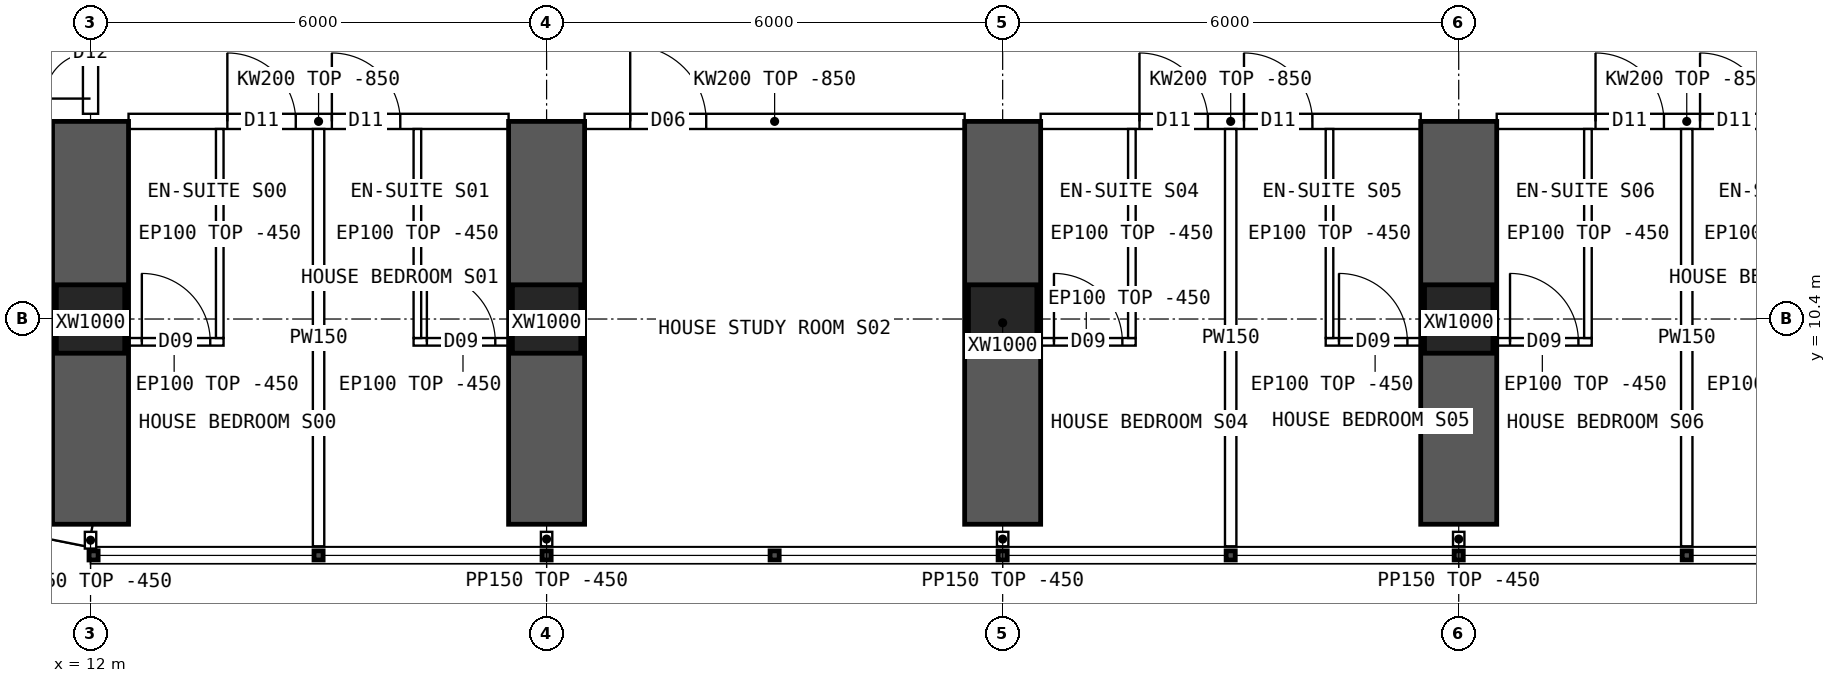
"""IFC4 building model, lengths in metres.
Left out: names, types, materials, properties, quantities, classifications, styles, units other than length and angle.
Written with IfcOpenShell. Run it as: python <this file> out.ifc"""

import sys

from ifc_helpers import new_model, si_unit, direction, frame, frame_2d, origin, origin_2d, place, context, subcontext, project, spatial, polyline, rectangle, hollow_rectangle, outline, extrude, element, fill, save


model = new_model("IFC4")
c1 = context("Model", 3, precision=1e-05, world=origin(), true_north=direction((0.0, 1.0)))
c2 = subcontext(c1, "Body", "Model", "MODEL_VIEW")
j1 = project(units=[si_unit("LENGTHUNIT", "METRE"), si_unit("PLANEANGLEUNIT", "RADIAN")], contexts=[c1])
p1 = place(None, origin())
s1 = spatial("IfcSite", under=j1, at=p1, CompositionType="ELEMENT")
p2 = place(p1, origin())
s2 = spatial("IfcBuilding", under=s1, at=p2, CompositionType="ELEMENT")
p3 = place(p2, frame((0.0, 0.0, 50.2)))
s3 = spatial("IfcBuildingStorey", under=s2, at=p3, CompositionType="ELEMENT", Elevation=50.2)
for number, where, z_axis, x_axis in (
    (1, (12.0, 10.4, 0.0), (0.0, 0.0, 1.0), (1.0, 0.0, 0.0)),
    (2, (18.0, 10.4, 0.0), (0.0, 0.0, 1.0), (1.0, 0.0, 0.0)),
    (3, (24.0, 10.4, 0.0), (0.0, 0.0, 1.0), (1.0, 0.0, 0.0)),
    (4, (30.0, 10.4, 0.0), (0.0, 0.0, 1.0), (1.0, 0.0, 0.0)),
):
    element("IfcColumn", number, at=place(p3, frame(where, z_axis=z_axis, x_axis=x_axis)), inside=s3, PredefinedType="COLUMN", context=c2, shape_type="SweptSolid", body=[
        extrude(hollow_rectangle(XDim=0.9, YDim=0.9, WallThickness=0.09, at=origin_2d()), origin(), (0.0, 0.0, 1.0), 3.75),
    ])
for number, where, z_axis, x_axis in (
    (5, (12.0, 7.7, 0.0), (0.0, 0.0, 1.0), (0.0, 1.0, 0.0)),
    (6, (18.0, 7.7, 0.0), (0.0, 0.0, 1.0), (0.0, 1.0, 0.0)),
    (7, (24.0, 7.7, 0.0), (0.0, 0.0, 1.0), (0.0, 1.0, 0.0)),
    (8, (30.0, 7.7, 0.0), (0.0, 0.0, 1.0), (0.0, 1.0, 0.0)),
):
    element("IfcWall", number, at=place(p3, frame(where, z_axis=z_axis, x_axis=x_axis)), inside=s3, PredefinedType="SHEAR", context=c2, shape_type="SweptSolid", body=[
        extrude(rectangle(XDim=5.3, YDim=1.0, at=frame_2d((2.65, 0.0))), origin(), (0.0, 0.0, 1.0), 3.75),
    ])
p4 = place(p3, frame((8.843, 8.178, 0.0), z_axis=(0.0, 0.0, 1.0), x_axis=(0.980787251524, -0.195080412259, 0.0)))
e9 = element("IfcWall", 9, at=p4, inside=s3, PredefinedType="SOLIDWALL", context=c2, shape_type="SweptSolid", body=[
    extrude(outline(polyline([(-0.03, -0.15), (3.249, -0.15), (3.189, 0.15), (0.03, 0.15), (-0.03, -0.15)])), origin(), (0.0, 0.0, 1.0), 3.3),
])
p5 = place(p4, frame((0.909, 0.0, 0.9)))
e10 = element("IfcOpeningElement", 10, at=p5, cuts=e9, PredefinedType="OPENING", context=c2, shape_type="SweptSolid", body=[
    extrude(rectangle(XDim=1.4, YDim=1.8, at=frame_2d((0.7, 0.9))), frame((0.0, 0.16, 0.0), z_axis=(0.0, -1.0, 0.0), x_axis=(1.0, 0.0, 0.0)), (0.0, 0.0, 1.0), 0.32),
])
p6 = place(p3, frame((12.5, 13.0, 0.0), z_axis=(0.0, 0.0, 1.0), x_axis=(1.0, 0.0, 0.0)))
e11 = element("IfcWall", 11, at=p6, inside=s3, PredefinedType="SOLIDWALL", context=c2, shape_type="SweptSolid", body=[
    extrude(outline(polyline([(0.0, 0.0), (5.0, 0.0), (5.0, 2.9), (0.0, 2.9), (0.0, 0.0)])), frame((0.0, 0.1, 0.0), z_axis=(0.0, -1.0, 0.0), x_axis=(1.0, 0.0, 0.0)), (0.0, 0.0, 1.0), 0.2),
])
p7 = place(p6, frame((1.3, 0.0, 0.0)))
e12 = element("IfcOpeningElement", 12, at=p7, cuts=e11, PredefinedType="OPENING", context=c2, shape_type="SweptSolid", body=[
    extrude(rectangle(XDim=0.9, YDim=2.1, at=frame_2d((0.45, 1.05))), frame((0.0, 0.11, 0.0), z_axis=(0.0, -1.0, 0.0), x_axis=(1.0, 0.0, 0.0)), (0.0, 0.0, 1.0), 0.22),
])
p8 = place(p6, frame((2.675, 0.0, 0.0)))
e13 = element("IfcOpeningElement", 13, at=p8, cuts=e11, PredefinedType="OPENING", context=c2, shape_type="SweptSolid", body=[
    extrude(rectangle(XDim=0.9, YDim=2.1, at=frame_2d((0.45, 1.05))), frame((0.0, 0.11, 0.0), z_axis=(0.0, -1.0, 0.0), x_axis=(1.0, 0.0, 0.0)), (0.0, 0.0, 1.0), 0.22),
])
p9 = place(p3, frame((18.5, 13.0, 0.0), z_axis=(0.0, 0.0, 1.0), x_axis=(1.0, 0.0, 0.0)))
e14 = element("IfcWall", 14, at=p9, inside=s3, PredefinedType="SOLIDWALL", context=c2, shape_type="SweptSolid", body=[
    extrude(outline(polyline([(0.0, 0.0), (5.0, 0.0), (5.0, 2.9), (0.0, 2.9), (0.0, 0.0)])), frame((0.0, 0.1, 0.0), z_axis=(0.0, -1.0, 0.0), x_axis=(1.0, 0.0, 0.0)), (0.0, 0.0, 1.0), 0.2),
])
p10 = place(p9, frame((0.6, 0.0, 0.0)))
e15 = element("IfcOpeningElement", 15, at=p10, cuts=e14, PredefinedType="OPENING", context=c2, shape_type="SweptSolid", body=[
    extrude(rectangle(XDim=1.0, YDim=2.1, at=frame_2d((0.5, 1.05))), frame((0.0, 0.11, 0.0), z_axis=(0.0, -1.0, 0.0), x_axis=(1.0, 0.0, 0.0)), (0.0, 0.0, 1.0), 0.22),
])
p11 = place(p3, frame((24.5, 13.0, 0.0), z_axis=(0.0, 0.0, 1.0), x_axis=(1.0, 0.0, 0.0)))
e16 = element("IfcWall", 16, at=p11, inside=s3, PredefinedType="SOLIDWALL", context=c2, shape_type="SweptSolid", body=[
    extrude(outline(polyline([(0.0, 0.0), (5.0, 0.0), (5.0, 2.9), (0.0, 2.9), (0.0, 0.0)])), frame((0.0, 0.1, 0.0), z_axis=(0.0, -1.0, 0.0), x_axis=(1.0, 0.0, 0.0)), (0.0, 0.0, 1.0), 0.2),
])
p12 = place(p11, frame((1.3, 0.0, 0.0)))
e17 = element("IfcOpeningElement", 17, at=p12, cuts=e16, PredefinedType="OPENING", context=c2, shape_type="SweptSolid", body=[
    extrude(rectangle(XDim=0.9, YDim=2.1, at=frame_2d((0.45, 1.05))), frame((0.0, 0.11, 0.0), z_axis=(0.0, -1.0, 0.0), x_axis=(1.0, 0.0, 0.0)), (0.0, 0.0, 1.0), 0.22),
])
p13 = place(p11, frame((2.675, 0.0, 0.0)))
e18 = element("IfcOpeningElement", 18, at=p13, cuts=e16, PredefinedType="OPENING", context=c2, shape_type="SweptSolid", body=[
    extrude(rectangle(XDim=0.9, YDim=2.1, at=frame_2d((0.45, 1.05))), frame((0.0, 0.11, 0.0), z_axis=(0.0, -1.0, 0.0), x_axis=(1.0, 0.0, 0.0)), (0.0, 0.0, 1.0), 0.22),
])
p14 = place(p3, frame((30.5, 13.0, 0.0), z_axis=(0.0, 0.0, 1.0), x_axis=(1.0, 0.0, 0.0)))
e19 = element("IfcWall", 19, at=p14, inside=s3, PredefinedType="SOLIDWALL", context=c2, shape_type="SweptSolid", body=[
    extrude(outline(polyline([(0.0, 0.0), (5.0, 0.0), (5.0, 2.9), (0.0, 2.9), (0.0, 0.0)])), frame((0.0, 0.1, 0.0), z_axis=(0.0, -1.0, 0.0), x_axis=(1.0, 0.0, 0.0)), (0.0, 0.0, 1.0), 0.2),
])
p15 = place(p14, frame((1.3, 0.0, 0.0)))
e20 = element("IfcOpeningElement", 20, at=p15, cuts=e19, PredefinedType="OPENING", context=c2, shape_type="SweptSolid", body=[
    extrude(rectangle(XDim=0.9, YDim=2.1, at=frame_2d((0.45, 1.05))), frame((0.0, 0.11, 0.0), z_axis=(0.0, -1.0, 0.0), x_axis=(1.0, 0.0, 0.0)), (0.0, 0.0, 1.0), 0.22),
])
p16 = place(p14, frame((2.675, 0.0, 0.0)))
e21 = element("IfcOpeningElement", 21, at=p16, cuts=e19, PredefinedType="OPENING", context=c2, shape_type="SweptSolid", body=[
    extrude(rectangle(XDim=0.9, YDim=2.1, at=frame_2d((0.45, 1.05))), frame((0.0, 0.11, 0.0), z_axis=(0.0, -1.0, 0.0), x_axis=(1.0, 0.0, 0.0)), (0.0, 0.0, 1.0), 0.22),
])
p17 = place(p3, frame((15.0, 7.41, 0.0), z_axis=(0.0, 0.0, 1.0), x_axis=(0.0, 1.0, 0.0)))
e22 = element("IfcWall", 22, at=p17, inside=s3, PredefinedType="PARTITIONING", context=c2, shape_type="SweptSolid", body=[
    extrude(outline(polyline([(0.0, 0.0), (5.49, 0.0), (5.49, 2.9), (5.442, 2.9), (5.44, 3.3), (3.192, 3.3), (3.19, 2.9), (2.792, 2.9), (2.79, 3.3), (0.0, 3.3), (0.0, 0.0)])), frame((0.0, 0.075, 0.0), z_axis=(0.0, -1.0, 0.0), x_axis=(1.0, 0.0, 0.0)), (0.0, 0.0, 1.0), 0.15),
])
p18 = place(p3, frame((13.75, 10.1, 0.0), z_axis=(0.0, 0.0, 1.0), x_axis=(-1.0, 0.0, 0.0)))
e23 = element("IfcWall", 23, at=p18, inside=s3, PredefinedType="PARTITIONING", context=c2, shape_type="SweptSolid", body=[
    extrude(rectangle(XDim=1.3, YDim=0.1, at=frame_2d((0.65, 0.0))), origin(), (0.0, 0.0, 1.0), 3.3),
])
p19 = place(p18, frame((0.175, 0.0, 0.0)))
e24 = element("IfcOpeningElement", 24, at=p19, cuts=e23, PredefinedType="OPENING", context=c2, shape_type="SweptSolid", body=[
    extrude(rectangle(XDim=0.9, YDim=2.1, at=frame_2d((0.45, 1.05))), frame((0.0, 0.06, 0.0), z_axis=(0.0, -1.0, 0.0), x_axis=(1.0, 0.0, 0.0)), (0.0, 0.0, 1.0), 0.12),
])
p20 = place(p3, frame((13.7, 10.15, 0.0), z_axis=(0.0, 0.0, 1.0), x_axis=(0.0, 1.0, 0.0)))
e25 = element("IfcWall", 25, at=p20, inside=s3, PredefinedType="PARTITIONING", context=c2, shape_type="SweptSolid", body=[
    extrude(outline(polyline([(0.0, 0.0), (2.75, 0.0), (2.75, 2.9), (2.702, 2.9), (2.7, 3.3), (0.452, 3.3), (0.45, 2.9), (0.052, 2.9), (0.05, 3.3), (0.0, 3.3), (0.0, 0.0)])), frame((0.0, 0.05, 0.0), z_axis=(0.0, -1.0, 0.0), x_axis=(1.0, 0.0, 0.0)), (0.0, 0.0, 1.0), 0.1),
])
p21 = place(p3, frame((17.55, 10.1, 0.0), z_axis=(0.0, 0.0, 1.0), x_axis=(-1.0, 0.0, 0.0)))
e26 = element("IfcWall", 26, at=p21, inside=s3, PredefinedType="PARTITIONING", context=c2, shape_type="SweptSolid", body=[
    extrude(rectangle(XDim=1.3, YDim=0.1, at=frame_2d((0.65, 0.0))), origin(), (0.0, 0.0, 1.0), 3.3),
])
p22 = place(p21, frame((0.225, 0.0, 0.0)))
e27 = element("IfcOpeningElement", 27, at=p22, cuts=e26, PredefinedType="OPENING", context=c2, shape_type="SweptSolid", body=[
    extrude(rectangle(XDim=0.9, YDim=2.1, at=frame_2d((0.45, 1.05))), frame((0.0, 0.06, 0.0), z_axis=(0.0, -1.0, 0.0), x_axis=(1.0, 0.0, 0.0)), (0.0, 0.0, 1.0), 0.12),
])
p23 = place(p3, frame((16.3, 10.15, 0.0), z_axis=(0.0, 0.0, 1.0), x_axis=(0.0, 1.0, 0.0)))
e28 = element("IfcWall", 28, at=p23, inside=s3, PredefinedType="PARTITIONING", context=c2, shape_type="SweptSolid", body=[
    extrude(outline(polyline([(0.0, 0.0), (2.75, 0.0), (2.75, 2.9), (2.702, 2.9), (2.7, 3.3), (0.452, 3.3), (0.45, 2.9), (0.052, 2.9), (0.05, 3.3), (0.0, 3.3), (0.0, 0.0)])), frame((0.0, 0.05, 0.0), z_axis=(0.0, -1.0, 0.0), x_axis=(1.0, 0.0, 0.0)), (0.0, 0.0, 1.0), 0.1),
])
p24 = place(p3, frame((27.0, 7.41, 0.0), z_axis=(0.0, 0.0, 1.0), x_axis=(0.0, 1.0, 0.0)))
e29 = element("IfcWall", 29, at=p24, inside=s3, PredefinedType="PARTITIONING", context=c2, shape_type="SweptSolid", body=[
    extrude(outline(polyline([(0.0, 0.0), (5.49, 0.0), (5.49, 2.9), (5.442, 2.9), (5.44, 3.3), (3.192, 3.3), (3.19, 2.9), (2.792, 2.9), (2.79, 3.3), (0.0, 3.3), (0.0, 0.0)])), frame((0.0, 0.075, 0.0), z_axis=(0.0, -1.0, 0.0), x_axis=(1.0, 0.0, 0.0)), (0.0, 0.0, 1.0), 0.15),
])
p25 = place(p3, frame((25.75, 10.1, 0.0), z_axis=(0.0, 0.0, 1.0), x_axis=(-1.0, 0.0, 0.0)))
e30 = element("IfcWall", 30, at=p25, inside=s3, PredefinedType="PARTITIONING", context=c2, shape_type="SweptSolid", body=[
    extrude(rectangle(XDim=1.3, YDim=0.1, at=frame_2d((0.65, 0.0))), origin(), (0.0, 0.0, 1.0), 3.3),
])
p26 = place(p25, frame((0.175, 0.0, 0.0)))
e31 = element("IfcOpeningElement", 31, at=p26, cuts=e30, PredefinedType="OPENING", context=c2, shape_type="SweptSolid", body=[
    extrude(rectangle(XDim=0.9, YDim=2.1, at=frame_2d((0.45, 1.05))), frame((0.0, 0.06, 0.0), z_axis=(0.0, -1.0, 0.0), x_axis=(1.0, 0.0, 0.0)), (0.0, 0.0, 1.0), 0.12),
])
p27 = place(p3, frame((25.7, 10.15, 0.0), z_axis=(0.0, 0.0, 1.0), x_axis=(0.0, 1.0, 0.0)))
e32 = element("IfcWall", 32, at=p27, inside=s3, PredefinedType="PARTITIONING", context=c2, shape_type="SweptSolid", body=[
    extrude(outline(polyline([(0.0, 0.0), (2.75, 0.0), (2.75, 2.9), (2.702, 2.9), (2.7, 3.3), (0.452, 3.3), (0.45, 2.9), (0.052, 2.9), (0.05, 3.3), (0.0, 3.3), (0.0, 0.0)])), frame((0.0, 0.05, 0.0), z_axis=(0.0, -1.0, 0.0), x_axis=(1.0, 0.0, 0.0)), (0.0, 0.0, 1.0), 0.1),
])
p28 = place(p3, frame((29.55, 10.1, 0.0), z_axis=(0.0, 0.0, 1.0), x_axis=(-1.0, 0.0, 0.0)))
e33 = element("IfcWall", 33, at=p28, inside=s3, PredefinedType="PARTITIONING", context=c2, shape_type="SweptSolid", body=[
    extrude(rectangle(XDim=1.3, YDim=0.1, at=frame_2d((0.65, 0.0))), origin(), (0.0, 0.0, 1.0), 3.3),
])
p29 = place(p28, frame((0.225, 0.0, 0.0)))
e34 = element("IfcOpeningElement", 34, at=p29, cuts=e33, PredefinedType="OPENING", context=c2, shape_type="SweptSolid", body=[
    extrude(rectangle(XDim=0.9, YDim=2.1, at=frame_2d((0.45, 1.05))), frame((0.0, 0.06, 0.0), z_axis=(0.0, -1.0, 0.0), x_axis=(1.0, 0.0, 0.0)), (0.0, 0.0, 1.0), 0.12),
])
p30 = place(p3, frame((28.3, 10.15, 0.0), z_axis=(0.0, 0.0, 1.0), x_axis=(0.0, 1.0, 0.0)))
e35 = element("IfcWall", 35, at=p30, inside=s3, PredefinedType="PARTITIONING", context=c2, shape_type="SweptSolid", body=[
    extrude(outline(polyline([(0.0, 0.0), (2.75, 0.0), (2.75, 2.9), (2.702, 2.9), (2.7, 3.3), (0.452, 3.3), (0.45, 2.9), (0.052, 2.9), (0.05, 3.3), (0.0, 3.3), (0.0, 0.0)])), frame((0.0, 0.05, 0.0), z_axis=(0.0, -1.0, 0.0), x_axis=(1.0, 0.0, 0.0)), (0.0, 0.0, 1.0), 0.1),
])
p31 = place(p3, frame((33.0, 7.41, 0.0), z_axis=(0.0, 0.0, 1.0), x_axis=(0.0, 1.0, 0.0)))
e36 = element("IfcWall", 36, at=p31, inside=s3, PredefinedType="PARTITIONING", context=c2, shape_type="SweptSolid", body=[
    extrude(outline(polyline([(0.0, 0.0), (5.49, 0.0), (5.49, 2.9), (5.442, 2.9), (5.44, 3.3), (3.192, 3.3), (3.19, 2.9), (2.792, 2.9), (2.79, 3.3), (0.0, 3.3), (0.0, 0.0)])), frame((0.0, 0.075, 0.0), z_axis=(0.0, -1.0, 0.0), x_axis=(1.0, 0.0, 0.0)), (0.0, 0.0, 1.0), 0.15),
])
p32 = place(p3, frame((31.75, 10.1, 0.0), z_axis=(0.0, 0.0, 1.0), x_axis=(-1.0, 0.0, 0.0)))
e37 = element("IfcWall", 37, at=p32, inside=s3, PredefinedType="PARTITIONING", context=c2, shape_type="SweptSolid", body=[
    extrude(rectangle(XDim=1.3, YDim=0.1, at=frame_2d((0.65, 0.0))), origin(), (0.0, 0.0, 1.0), 3.3),
])
p33 = place(p32, frame((0.175, 0.0, 0.0)))
e38 = element("IfcOpeningElement", 38, at=p33, cuts=e37, PredefinedType="OPENING", context=c2, shape_type="SweptSolid", body=[
    extrude(rectangle(XDim=0.9, YDim=2.1, at=frame_2d((0.45, 1.05))), frame((0.0, 0.06, 0.0), z_axis=(0.0, -1.0, 0.0), x_axis=(1.0, 0.0, 0.0)), (0.0, 0.0, 1.0), 0.12),
])
p34 = place(p3, frame((31.7, 10.15, 0.0), z_axis=(0.0, 0.0, 1.0), x_axis=(0.0, 1.0, 0.0)))
e39 = element("IfcWall", 39, at=p34, inside=s3, PredefinedType="PARTITIONING", context=c2, shape_type="SweptSolid", body=[
    extrude(outline(polyline([(0.0, 0.0), (2.75, 0.0), (2.75, 2.9), (2.702, 2.9), (2.7, 3.3), (0.452, 3.3), (0.45, 2.9), (0.052, 2.9), (0.05, 3.3), (0.0, 3.3), (0.0, 0.0)])), frame((0.0, 0.05, 0.0), z_axis=(0.0, -1.0, 0.0), x_axis=(1.0, 0.0, 0.0)), (0.0, 0.0, 1.0), 0.1),
])
p35 = place(p3, frame((12.0, 13.1, 0.0), z_axis=(0.0, 0.0, 1.0), x_axis=(0.0, 1.0, 0.0)))
e40 = element("IfcWall", 40, at=p35, inside=s3, PredefinedType="SOLIDWALL", context=c2, shape_type="SweptSolid", body=[
    extrude(outline(polyline([(0.0, 0.0), (1.6, 0.0), (1.6, 2.85), (0.0, 2.85), (0.0, 0.0)])), frame((0.0, 0.1, 0.0), z_axis=(0.0, -1.0, 0.0), x_axis=(1.0, 0.0, 0.0)), (0.0, 0.0, 1.0), 0.2),
])
p36 = place(p35, frame((0.2, 0.0, 0.0)))
e41 = element("IfcOpeningElement", 41, at=p36, cuts=e40, PredefinedType="OPENING", context=c2, shape_type="SweptSolid", body=[
    extrude(rectangle(XDim=1.2, YDim=2.1, at=frame_2d((0.6, 1.05))), frame((0.0, 0.11, 0.0), z_axis=(0.0, -1.0, 0.0), x_axis=(1.0, 0.0, 0.0)), (0.0, 0.0, 1.0), 0.22),
])
p37 = place(p3, frame((12.0, 7.6, 0.0), z_axis=(0.0, 0.0, 1.0), x_axis=(0.0, -1.0, 0.0)))
e42 = element("IfcWall", 42, at=p37, inside=s3, PredefinedType="PARTITIONING", context=c2, shape_type="SweptSolid", body=[
    extrude(rectangle(XDim=0.22, YDim=0.15, at=frame_2d((0.11, 0.0))), origin(), (0.0, 0.0, 1.0), 3.3),
])
for number, where, z_axis, x_axis in (
    (43, (18.0, 7.6, 0.0), (0.0, 0.0, 1.0), (0.0, -1.0, 0.0)),
    (44, (24.0, 7.6, 0.0), (0.0, 0.0, 1.0), (0.0, -1.0, 0.0)),
    (45, (30.0, 7.6, 0.0), (0.0, 0.0, 1.0), (0.0, -1.0, 0.0)),
):
    element("IfcWall", number, at=place(p3, frame(where, z_axis=z_axis, x_axis=x_axis)), inside=s3, PredefinedType="PARTITIONING", context=c2, shape_type="SweptSolid", body=[
        extrude(rectangle(XDim=0.19, YDim=0.15, at=frame_2d((0.095, 0.0))), origin(), (0.0, 0.0, 1.0), 3.3),
    ])
p38 = place(p19, origin())
e46 = element("IfcDoor", 46, at=p38, inside=s3, OperationType="SINGLE_SWING_RIGHT", PredefinedType="DOOR", context=c2, shape_type="SweptSolid", body=[
    extrude(rectangle(XDim=0.9, YDim=2.1, at=frame_2d((0.45, 1.05))), frame((0.0, 0.025, 0.0), z_axis=(0.0, -1.0, 0.0), x_axis=(1.0, 0.0, 0.0)), (0.0, 0.0, 1.0), 0.05),
])
fill(e24, e46)
p39 = place(p7, origin())
e47 = element("IfcDoor", 47, at=p39, inside=s3, OperationType="SINGLE_SWING_LEFT", PredefinedType="DOOR", context=c2, shape_type="SweptSolid", body=[
    extrude(rectangle(XDim=0.9, YDim=2.1, at=frame_2d((0.45, 1.05))), frame((0.0, 0.025, 0.0), z_axis=(0.0, -1.0, 0.0), x_axis=(1.0, 0.0, 0.0)), (0.0, 0.0, 1.0), 0.05),
])
fill(e12, e47)
p40 = place(p22, origin())
e48 = element("IfcDoor", 48, at=p40, inside=s3, OperationType="SINGLE_SWING_RIGHT", PredefinedType="DOOR", context=c2, shape_type="SweptSolid", body=[
    extrude(rectangle(XDim=0.9, YDim=2.1, at=frame_2d((0.45, 1.05))), frame((0.0, 0.025, 0.0), z_axis=(0.0, -1.0, 0.0), x_axis=(1.0, 0.0, 0.0)), (0.0, 0.0, 1.0), 0.05),
])
fill(e27, e48)
p41 = place(p8, origin())
e49 = element("IfcDoor", 49, at=p41, inside=s3, OperationType="SINGLE_SWING_LEFT", PredefinedType="DOOR", context=c2, shape_type="SweptSolid", body=[
    extrude(rectangle(XDim=0.9, YDim=2.1, at=frame_2d((0.45, 1.05))), frame((0.0, 0.025, 0.0), z_axis=(0.0, -1.0, 0.0), x_axis=(1.0, 0.0, 0.0)), (0.0, 0.0, 1.0), 0.05),
])
fill(e13, e49)
p42 = place(p10, origin())
e50 = element("IfcDoor", 50, at=p42, inside=s3, OperationType="SINGLE_SWING_LEFT", PredefinedType="DOOR", context=c2, shape_type="SweptSolid", body=[
    extrude(rectangle(XDim=1.0, YDim=2.1, at=frame_2d((0.5, 1.05))), frame((0.0, 0.025, 0.0), z_axis=(0.0, -1.0, 0.0), x_axis=(1.0, 0.0, 0.0)), (0.0, 0.0, 1.0), 0.05),
])
fill(e15, e50)
p43 = place(p26, origin())
e51 = element("IfcDoor", 51, at=p43, inside=s3, OperationType="SINGLE_SWING_RIGHT", PredefinedType="DOOR", context=c2, shape_type="SweptSolid", body=[
    extrude(rectangle(XDim=0.9, YDim=2.1, at=frame_2d((0.45, 1.05))), frame((0.0, 0.025, 0.0), z_axis=(0.0, -1.0, 0.0), x_axis=(1.0, 0.0, 0.0)), (0.0, 0.0, 1.0), 0.05),
])
fill(e31, e51)
p44 = place(p12, origin())
e52 = element("IfcDoor", 52, at=p44, inside=s3, OperationType="SINGLE_SWING_LEFT", PredefinedType="DOOR", context=c2, shape_type="SweptSolid", body=[
    extrude(rectangle(XDim=0.9, YDim=2.1, at=frame_2d((0.45, 1.05))), frame((0.0, 0.025, 0.0), z_axis=(0.0, -1.0, 0.0), x_axis=(1.0, 0.0, 0.0)), (0.0, 0.0, 1.0), 0.05),
])
fill(e17, e52)
p45 = place(p29, origin())
e53 = element("IfcDoor", 53, at=p45, inside=s3, OperationType="SINGLE_SWING_RIGHT", PredefinedType="DOOR", context=c2, shape_type="SweptSolid", body=[
    extrude(rectangle(XDim=0.9, YDim=2.1, at=frame_2d((0.45, 1.05))), frame((0.0, 0.025, 0.0), z_axis=(0.0, -1.0, 0.0), x_axis=(1.0, 0.0, 0.0)), (0.0, 0.0, 1.0), 0.05),
])
fill(e34, e53)
p46 = place(p13, origin())
e54 = element("IfcDoor", 54, at=p46, inside=s3, OperationType="SINGLE_SWING_LEFT", PredefinedType="DOOR", context=c2, shape_type="SweptSolid", body=[
    extrude(rectangle(XDim=0.9, YDim=2.1, at=frame_2d((0.45, 1.05))), frame((0.0, 0.025, 0.0), z_axis=(0.0, -1.0, 0.0), x_axis=(1.0, 0.0, 0.0)), (0.0, 0.0, 1.0), 0.05),
])
fill(e18, e54)
p47 = place(p33, origin())
e55 = element("IfcDoor", 55, at=p47, inside=s3, OperationType="SINGLE_SWING_RIGHT", PredefinedType="DOOR", context=c2, shape_type="SweptSolid", body=[
    extrude(rectangle(XDim=0.9, YDim=2.1, at=frame_2d((0.45, 1.05))), frame((0.0, 0.025, 0.0), z_axis=(0.0, -1.0, 0.0), x_axis=(1.0, 0.0, 0.0)), (0.0, 0.0, 1.0), 0.05),
])
fill(e38, e55)
p48 = place(p15, origin())
e56 = element("IfcDoor", 56, at=p48, inside=s3, OperationType="SINGLE_SWING_LEFT", PredefinedType="DOOR", context=c2, shape_type="SweptSolid", body=[
    extrude(rectangle(XDim=0.9, YDim=2.1, at=frame_2d((0.45, 1.05))), frame((0.0, 0.025, 0.0), z_axis=(0.0, -1.0, 0.0), x_axis=(1.0, 0.0, 0.0)), (0.0, 0.0, 1.0), 0.05),
])
fill(e20, e56)
p49 = place(p16, origin())
e57 = element("IfcDoor", 57, at=p49, inside=s3, OperationType="SINGLE_SWING_LEFT", PredefinedType="DOOR", context=c2, shape_type="SweptSolid", body=[
    extrude(rectangle(XDim=0.9, YDim=2.1, at=frame_2d((0.45, 1.05))), frame((0.0, 0.025, 0.0), z_axis=(0.0, -1.0, 0.0), x_axis=(1.0, 0.0, 0.0)), (0.0, 0.0, 1.0), 0.05),
])
fill(e21, e57)
p50 = place(p36, origin())
e58 = element("IfcDoor", 58, at=p50, inside=s3, OperationType="DOUBLE_DOOR_SINGLE_SWING", PredefinedType="DOOR", context=c2, shape_type="SweptSolid", body=[
    extrude(rectangle(XDim=1.2, YDim=2.1, at=frame_2d((0.6, 1.05))), frame((0.0, 0.025, 0.0), z_axis=(0.0, -1.0, 0.0), x_axis=(1.0, 0.0, 0.0)), (0.0, 0.0, 1.0), 0.05),
])
fill(e41, e58)
save(model, sys.argv[1])
